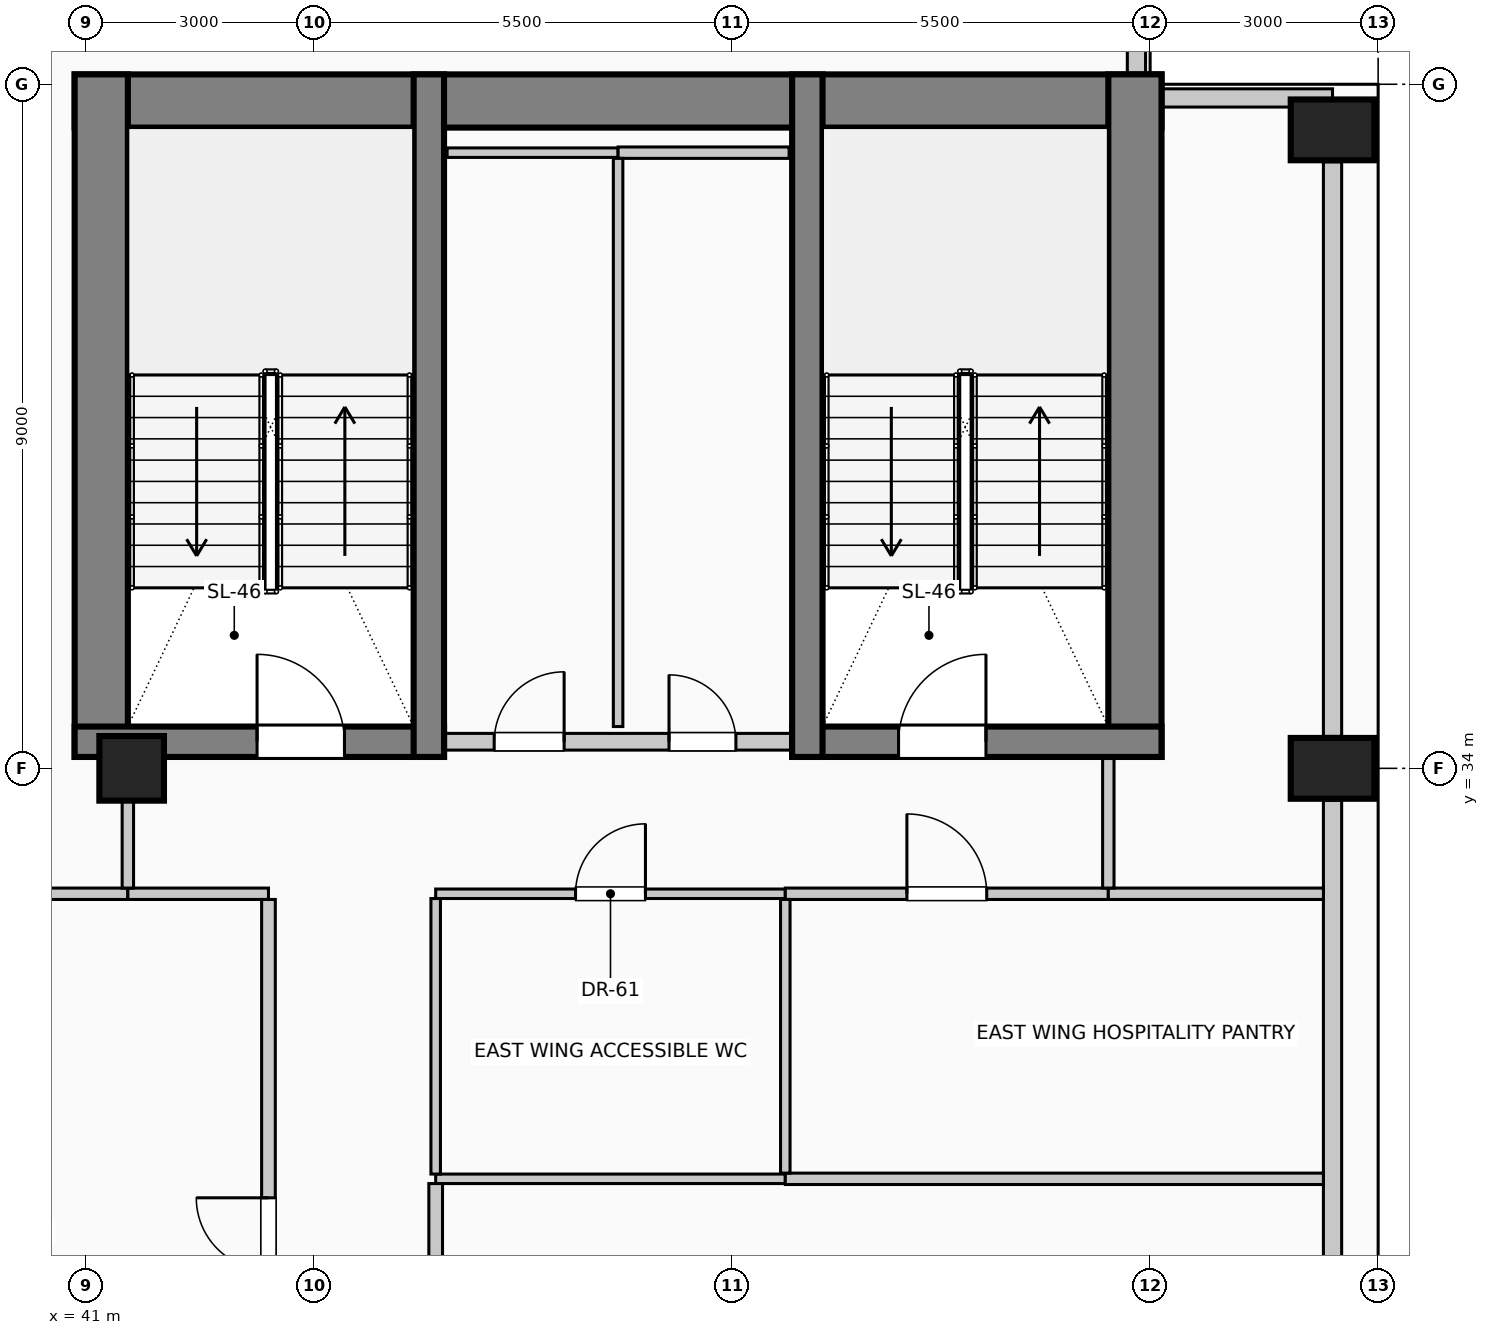
"""IFC4 building model, lengths in metres.
Left out: names, types, materials, properties, quantities, classifications, styles, units other than length and angle.
Written with IfcOpenShell. Run it as: python <this file> out.ifc"""

import sys

from ifc_helpers import new_model, si_unit, direction, frame, frame_2d, origin, origin_2d, place, context, subcontext, project, spatial, rectangle, circle, extrude, element, fill, save


model = new_model("IFC4")
c1 = context("Model", 3, precision=1e-05, world=origin(), true_north=direction((0.0, 1.0)))
c2 = subcontext(c1, "Body", "Model", "MODEL_VIEW")
j1 = project(units=[si_unit("LENGTHUNIT", "METRE"), si_unit("PLANEANGLEUNIT", "RADIAN")], contexts=[c1])
p1 = place(None, origin())
s1 = spatial("IfcSite", under=j1, at=p1, CompositionType="ELEMENT")
p2 = place(p1, origin())
s2 = spatial("IfcBuilding", under=s1, at=p2, CompositionType="ELEMENT")
p3 = place(p2, frame((0.0, 0.0, 194.6)))
s3 = spatial("IfcBuildingStorey", under=s2, at=p3, CompositionType="ELEMENT", Elevation=194.6)
p4 = place(p3, frame((40.85, 42.78, 0.0), z_axis=(0.0, 0.0, 1.0), x_axis=(1.0, 0.0, 0.0)))
e1 = element("IfcWall", 1, at=p4, inside=s3, PredefinedType="SHEAR", context=c2, shape_type="SweptSolid", body=[
    extrude(rectangle(XDim=14.3, YDim=0.7, at=frame_2d((7.15, 0.0))), origin(), (0.0, 0.0, 1.0), 4.0),
])
for number, where, z_axis, x_axis in (
    (2, (41.2, 34.15, 0.0), (0.0, 0.0, 1.0), (0.0, 1.0, 0.0)),
    (3, (54.8, 34.15, 0.0), (0.0, 0.0, 1.0), (0.0, 1.0, 0.0)),
):
    element("IfcWall", number, at=place(p3, frame(where, z_axis=z_axis, x_axis=x_axis)), inside=s3, PredefinedType="SHEAR", context=c2, shape_type="SweptSolid", body=[
        extrude(rectangle(XDim=8.98, YDim=0.7, at=frame_2d((4.49, 0.0))), origin(), (0.0, 0.0, 1.0), 4.0),
    ])
p5 = place(p3, frame((40.85, 34.35, 0.0), z_axis=(0.0, 0.0, 1.0), x_axis=(1.0, 0.0, 0.0)))
e4 = element("IfcWall", 4, at=p5, inside=s3, PredefinedType="SHEAR", context=c2, shape_type="SweptSolid", body=[
    extrude(rectangle(XDim=4.86, YDim=0.4, at=frame_2d((2.43, 0.0))), origin(), (0.0, 0.0, 1.0), 4.0),
])
p6 = place(p5, frame((2.4, 0.0, 0.0)))
e5 = element("IfcOpeningElement", 5, at=p6, cuts=e4, PredefinedType="OPENING", context=c2, shape_type="SweptSolid", body=[
    extrude(rectangle(XDim=1.15, YDim=2.2, at=frame_2d((0.575, 1.1))), frame((0.0, 0.21, 0.0), z_axis=(0.0, -1.0, 0.0), x_axis=(1.0, 0.0, 0.0)), (0.0, 0.0, 1.0), 0.42),
])
p7 = place(p3, frame((45.51, 34.15, 0.0), z_axis=(0.0, 0.0, 1.0), x_axis=(0.0, 1.0, 0.0)))
e6 = element("IfcWall", 6, at=p7, inside=s3, PredefinedType="SHEAR", context=c2, shape_type="SweptSolid", body=[
    extrude(rectangle(XDim=8.98, YDim=0.4, at=frame_2d((4.49, 0.0))), origin(), (0.0, 0.0, 1.0), 4.0),
])
p8 = place(p3, frame((50.29, 34.35, 0.0), z_axis=(0.0, 0.0, 1.0), x_axis=(1.0, 0.0, 0.0)))
e7 = element("IfcWall", 7, at=p8, inside=s3, PredefinedType="SHEAR", context=c2, shape_type="SweptSolid", body=[
    extrude(rectangle(XDim=4.86, YDim=0.4, at=frame_2d((2.43, 0.0))), origin(), (0.0, 0.0, 1.0), 4.0),
])
p9 = place(p8, frame((1.4, 0.0, 0.0)))
e8 = element("IfcOpeningElement", 8, at=p9, cuts=e7, PredefinedType="OPENING", context=c2, shape_type="SweptSolid", body=[
    extrude(rectangle(XDim=1.15, YDim=2.2, at=frame_2d((0.575, 1.1))), frame((0.0, 0.21, 0.0), z_axis=(0.0, -1.0, 0.0), x_axis=(1.0, 0.0, 0.0)), (0.0, 0.0, 1.0), 0.42),
])
p10 = place(p3, frame((50.49, 34.15, 0.0), z_axis=(0.0, 0.0, 1.0), x_axis=(0.0, 1.0, 0.0)))
e9 = element("IfcWall", 9, at=p10, inside=s3, PredefinedType="SHEAR", context=c2, shape_type="SweptSolid", body=[
    extrude(rectangle(XDim=8.98, YDim=0.4, at=frame_2d((4.49, 0.0))), origin(), (0.0, 0.0, 1.0), 4.0),
])
for number, where, z_axis, x_axis in (
    (10, (57.4, 34.0, 0.0), (0.0, 0.0, 1.0), (0.0, 1.0, 0.0)),
    (11, (57.4, 42.4, 0.0), (0.0, 0.0, 1.0), (0.0, 1.0, 0.0)),
):
    element("IfcColumn", number, at=place(p3, frame(where, z_axis=z_axis, x_axis=x_axis)), inside=s3, PredefinedType="COLUMN", context=c2, shape_type="SweptSolid", body=[
        extrude(rectangle(XDim=0.8, YDim=1.1, at=origin_2d()), origin(), (0.0, 0.0, 1.0), 4.0),
    ])
p11 = place(p3, frame((41.6, 34.0, 0.0), z_axis=(0.0, 0.0, 1.0), x_axis=(1.0, 0.0, 0.0)))
e12 = element("IfcColumn", 12, at=p11, inside=s3, PredefinedType="COLUMN", context=c2, shape_type="SweptSolid", body=[
    extrude(circle(Radius=0.425, at=origin_2d()), origin(), (0.0, 0.0, 1.0), 4.0),
])
p12 = place(p3, frame((57.4, 33.58, 0.0), z_axis=(0.0, 0.0, 1.0), x_axis=(0.0, -1.0, 0.0)))
e13 = element("IfcWall", 13, at=p12, inside=s3, PredefinedType="SOLIDWALL", context=c2, shape_type="SweptSolid", body=[
    extrude(rectangle(XDim=7.16, YDim=0.24, at=frame_2d((3.58, 0.0))), origin(), (0.0, 0.0, 1.0), 3.0),
])
p13 = place(p3, frame((57.4, 41.98, 0.0), z_axis=(0.0, 0.0, 1.0), x_axis=(0.0, -1.0, 0.0)))
e14 = element("IfcWall", 14, at=p13, inside=s3, PredefinedType="SOLIDWALL", context=c2, shape_type="SweptSolid", body=[
    extrude(rectangle(XDim=7.56, YDim=0.24, at=frame_2d((3.78, 0.0))), origin(), (0.0, 0.0, 1.0), 3.0),
])
p14 = place(p3, frame((54.82, 45.4, 0.0), z_axis=(0.0, 0.0, 1.0), x_axis=(0.0, -1.0, 0.0)))
e15 = element("IfcWall", 15, at=p14, inside=s3, PredefinedType="SOLIDWALL", context=c2, shape_type="SweptSolid", body=[
    extrude(rectangle(XDim=2.265, YDim=0.24, at=frame_2d((1.132, 0.0))), origin(), (0.0, 0.0, 1.0), 3.75),
])
p15 = place(p3, frame((55.155, 42.82, 0.0), z_axis=(0.0, 0.0, 1.0), x_axis=(1.0, 0.0, 0.0)))
e16 = element("IfcWall", 16, at=p15, inside=s3, PredefinedType="SOLIDWALL", context=c2, shape_type="SweptSolid", body=[
    extrude(rectangle(XDim=2.245, YDim=0.24, at=frame_2d((1.123, 0.0))), origin(), (0.0, 0.0, 1.0), 3.75),
])
p16 = place(p3, frame((45.72, 34.35, 0.0), z_axis=(0.0, 0.0, 1.0), x_axis=(1.0, 0.0, 0.0)))
e17 = element("IfcWall", 17, at=p16, inside=s3, PredefinedType="PARTITIONING", context=c2, shape_type="SweptSolid", body=[
    extrude(rectangle(XDim=4.56, YDim=0.22, at=frame_2d((2.28, 0.0))), origin(), (0.0, 0.0, 1.0), 3.75),
])
p17 = place(p16, frame((0.65, 0.0, 0.0)))
e18 = element("IfcOpeningElement", 18, at=p17, cuts=e17, PredefinedType="OPENING", context=c2, shape_type="SweptSolid", body=[
    extrude(rectangle(XDim=0.92, YDim=2.1, at=frame_2d((0.46, 1.05))), frame((0.0, 0.12, 0.0), z_axis=(0.0, -1.0, 0.0), x_axis=(1.0, 0.0, 0.0)), (0.0, 0.0, 1.0), 0.24),
])
p18 = place(p16, frame((2.95, 0.0, 0.0)))
e19 = element("IfcOpeningElement", 19, at=p18, cuts=e17, PredefinedType="OPENING", context=c2, shape_type="SweptSolid", body=[
    extrude(rectangle(XDim=0.88, YDim=2.1, at=frame_2d((0.44, 1.05))), frame((0.0, 0.12, 0.0), z_axis=(0.0, -1.0, 0.0), x_axis=(1.0, 0.0, 0.0)), (0.0, 0.0, 1.0), 0.24),
])
p19 = place(p3, frame((45.6, 28.6, 0.0), z_axis=(0.0, 0.0, 1.0), x_axis=(1.0, 0.0, 0.0)))
e20 = element("IfcWall", 20, at=p19, inside=s3, PredefinedType="PARTITIONING", context=c2, shape_type="SweptSolid", body=[
    extrude(rectangle(XDim=4.6, YDim=0.125, at=frame_2d((2.3, 0.0))), origin(), (0.0, 0.0, 1.0), 3.75),
])
p20 = place(p3, frame((50.2, 28.6, 0.0), z_axis=(0.0, 0.0, 1.0), x_axis=(1.0, 0.0, 0.0)))
e21 = element("IfcWall", 21, at=p20, inside=s3, PredefinedType="PARTITIONING", context=c2, shape_type="SweptSolid", body=[
    extrude(rectangle(XDim=7.08, YDim=0.15, at=frame_2d((3.54, 0.0))), origin(), (0.0, 0.0, 1.0), 3.75),
])
p21 = place(p3, frame((34.12, 32.35, 0.0), z_axis=(0.0, 0.0, 1.0), x_axis=(1.0, 0.0, 0.0)))
e22 = element("IfcWall", 22, at=p21, inside=s3, PredefinedType="PARTITIONING", context=c2, shape_type="SweptSolid", body=[
    extrude(rectangle(XDim=7.43, YDim=0.15, at=frame_2d((3.715, 0.0))), origin(), (0.0, 0.0, 1.0), 3.75),
])
p22 = place(p3, frame((41.55, 32.35, 0.0), z_axis=(0.0, 0.0, 1.0), x_axis=(1.0, 0.0, 0.0)))
e23 = element("IfcWall", 23, at=p22, inside=s3, PredefinedType="PARTITIONING", context=c2, shape_type="SweptSolid", body=[
    extrude(rectangle(XDim=1.85, YDim=0.15, at=frame_2d((0.925, 0.0))), origin(), (0.0, 0.0, 1.0), 3.75),
])
p23 = place(p3, frame((45.6, 32.35, 0.0), z_axis=(0.0, 0.0, 1.0), x_axis=(1.0, 0.0, 0.0)))
e24 = element("IfcWall", 24, at=p23, inside=s3, PredefinedType="PARTITIONING", context=c2, shape_type="SweptSolid", body=[
    extrude(rectangle(XDim=4.6, YDim=0.125, at=frame_2d((2.3, 0.0))), origin(), (0.0, 0.0, 1.0), 3.75),
])
p24 = place(p23, frame((1.84, 0.0, 0.0)))
e25 = element("IfcOpeningElement", 25, at=p24, cuts=e24, PredefinedType="OPENING", context=c2, shape_type="SweptSolid", body=[
    extrude(rectangle(XDim=0.92, YDim=2.1, at=frame_2d((0.46, 1.05))), frame((0.0, 0.073, 0.0), z_axis=(0.0, -1.0, 0.0), x_axis=(1.0, 0.0, 0.0)), (0.0, 0.0, 1.0), 0.145),
])
p25 = place(p3, frame((50.2, 32.35, 0.0), z_axis=(0.0, 0.0, 1.0), x_axis=(1.0, 0.0, 0.0)))
e26 = element("IfcWall", 26, at=p25, inside=s3, PredefinedType="PARTITIONING", context=c2, shape_type="SweptSolid", body=[
    extrude(rectangle(XDim=4.25, YDim=0.15, at=frame_2d((2.125, 0.0))), origin(), (0.0, 0.0, 1.0), 3.75),
])
p26 = place(p25, frame((1.6, 0.0, 0.0)))
e27 = element("IfcOpeningElement", 27, at=p26, cuts=e26, PredefinedType="OPENING", context=c2, shape_type="SweptSolid", body=[
    extrude(rectangle(XDim=1.05, YDim=2.15, at=frame_2d((0.525, 1.075))), frame((0.0, 0.085, 0.0), z_axis=(0.0, -1.0, 0.0), x_axis=(1.0, 0.0, 0.0)), (0.0, 0.0, 1.0), 0.17),
])
p27 = place(p3, frame((54.45, 32.35, 0.0), z_axis=(0.0, 0.0, 1.0), x_axis=(1.0, 0.0, 0.0)))
e28 = element("IfcWall", 28, at=p27, inside=s3, PredefinedType="PARTITIONING", context=c2, shape_type="SweptSolid", body=[
    extrude(rectangle(XDim=2.83, YDim=0.15, at=frame_2d((1.415, 0.0))), origin(), (0.0, 0.0, 1.0), 3.75),
])
p28 = place(p3, frame((45.75, 42.1, 0.0), z_axis=(0.0, 0.0, 1.0), x_axis=(1.0, 0.0, 0.0)))
e29 = element("IfcWall", 29, at=p28, inside=s3, PredefinedType="PARTITIONING", context=c2, shape_type="SweptSolid", body=[
    extrude(rectangle(XDim=2.25, YDim=0.125, at=frame_2d((1.125, 0.0))), origin(), (0.0, 0.0, 1.0), 3.75),
])
p29 = place(p3, frame((48.0, 42.1, 0.0), z_axis=(0.0, 0.0, 1.0), x_axis=(1.0, 0.0, 0.0)))
e30 = element("IfcWall", 30, at=p29, inside=s3, PredefinedType="PARTITIONING", context=c2, shape_type="SweptSolid", body=[
    extrude(rectangle(XDim=2.25, YDim=0.15, at=frame_2d((1.125, 0.0))), origin(), (0.0, 0.0, 1.0), 3.75),
])
p30 = place(p3, frame((41.55, 32.425, 0.0), z_axis=(0.0, 0.0, 1.0), x_axis=(0.0, 1.0, 0.0)))
e31 = element("IfcWall", 31, at=p30, inside=s3, PredefinedType="PARTITIONING", context=c2, shape_type="SweptSolid", body=[
    extrude(rectangle(XDim=1.15, YDim=0.15, at=frame_2d((0.575, 0.0))), origin(), (0.0, 0.0, 1.0), 3.145),
])
p31 = place(p3, frame((43.4, 23.475, 0.0), z_axis=(0.0, 0.0, 1.0), x_axis=(0.0, 1.0, 0.0)))
e32 = element("IfcWall", 32, at=p31, inside=s3, PredefinedType="PARTITIONING", context=c2, shape_type="SweptSolid", body=[
    extrude(rectangle(XDim=8.8, YDim=0.18, at=frame_2d((4.4, 0.0))), origin(), (0.0, 0.0, 1.0), 3.75),
])
p32 = place(p31, frame((3.925, 0.0, 0.0)))
e33 = element("IfcOpeningElement", 33, at=p32, cuts=e32, PredefinedType="OPENING", context=c2, shape_type="SweptSolid", body=[
    extrude(rectangle(XDim=0.95, YDim=2.15, at=frame_2d((0.475, 1.075))), frame((0.0, 0.1, 0.0), z_axis=(0.0, -1.0, 0.0), x_axis=(1.0, 0.0, 0.0)), (0.0, 0.0, 1.0), 0.2),
])
p33 = place(p3, frame((45.6, 14.39, 0.0), z_axis=(0.0, 0.0, 1.0), x_axis=(0.0, 1.0, 0.0)))
e34 = element("IfcWall", 34, at=p33, inside=s3, PredefinedType="PARTITIONING", context=c2, shape_type="SweptSolid", body=[
    extrude(rectangle(XDim=14.148, YDim=0.18, at=frame_2d((7.074, 0.0))), origin(), (0.0, 0.0, 1.0), 3.75),
])
p34 = place(p3, frame((45.6, 28.663, 0.0), z_axis=(0.0, 0.0, 1.0), x_axis=(0.0, 1.0, 0.0)))
e35 = element("IfcWall", 35, at=p34, inside=s3, PredefinedType="PARTITIONING", context=c2, shape_type="SweptSolid", body=[
    extrude(rectangle(XDim=3.625, YDim=0.125, at=frame_2d((1.812, 0.0))), origin(), (0.0, 0.0, 1.0), 3.75),
])
p35 = place(p3, frame((48.0, 34.55, 0.0), z_axis=(0.0, 0.0, 1.0), x_axis=(0.0, 1.0, 0.0)))
e36 = element("IfcWall", 36, at=p35, inside=s3, PredefinedType="PARTITIONING", context=c2, shape_type="SweptSolid", body=[
    extrude(rectangle(XDim=7.475, YDim=0.125, at=frame_2d((3.737, 0.0))), origin(), (0.0, 0.0, 1.0), 3.75),
])
p36 = place(p3, frame((50.2, 28.675, 0.0), z_axis=(0.0, 0.0, 1.0), x_axis=(0.0, 1.0, 0.0)))
e37 = element("IfcWall", 37, at=p36, inside=s3, PredefinedType="PARTITIONING", context=c2, shape_type="SweptSolid", body=[
    extrude(rectangle(XDim=3.6, YDim=0.125, at=frame_2d((1.8, 0.0))), origin(), (0.0, 0.0, 1.0), 3.75),
])
p37 = place(p3, frame((54.45, 32.425, 0.0), z_axis=(0.0, 0.0, 1.0), x_axis=(0.0, 1.0, 0.0)))
e38 = element("IfcWall", 38, at=p37, inside=s3, PredefinedType="PARTITIONING", context=c2, shape_type="SweptSolid", body=[
    extrude(rectangle(XDim=1.725, YDim=0.15, at=frame_2d((0.862, 0.0))), origin(), (0.0, 0.0, 1.0), 3.75),
])
p38 = place(p6, origin())
e39 = element("IfcDoor", 39, at=p38, inside=s3, OperationType="SINGLE_SWING_LEFT", PredefinedType="DOOR", context=c2, shape_type="SweptSolid", body=[
    extrude(rectangle(XDim=1.15, YDim=2.2, at=frame_2d((0.575, 1.1))), frame((0.0, 0.025, 0.0), z_axis=(0.0, -1.0, 0.0), x_axis=(1.0, 0.0, 0.0)), (0.0, 0.0, 1.0), 0.05),
])
fill(e5, e39)
p39 = place(p17, origin())
e40 = element("IfcDoor", 40, at=p39, inside=s3, OperationType="SINGLE_SWING_RIGHT", PredefinedType="DOOR", context=c2, shape_type="SweptSolid", body=[
    extrude(rectangle(XDim=0.92, YDim=2.1, at=frame_2d((0.46, 1.05))), frame((0.0, 0.025, 0.0), z_axis=(0.0, -1.0, 0.0), x_axis=(1.0, 0.0, 0.0)), (0.0, 0.0, 1.0), 0.05),
])
fill(e18, e40)
p40 = place(p18, origin())
e41 = element("IfcDoor", 41, at=p40, inside=s3, OperationType="SINGLE_SWING_LEFT", PredefinedType="DOOR", context=c2, shape_type="SweptSolid", body=[
    extrude(rectangle(XDim=0.88, YDim=2.1, at=frame_2d((0.44, 1.05))), frame((0.0, 0.025, 0.0), z_axis=(0.0, -1.0, 0.0), x_axis=(1.0, 0.0, 0.0)), (0.0, 0.0, 1.0), 0.05),
])
fill(e19, e41)
p41 = place(p9, origin())
e42 = element("IfcDoor", 42, at=p41, inside=s3, OperationType="SINGLE_SWING_RIGHT", PredefinedType="DOOR", context=c2, shape_type="SweptSolid", body=[
    extrude(rectangle(XDim=1.15, YDim=2.2, at=frame_2d((0.575, 1.1))), frame((0.0, 0.025, 0.0), z_axis=(0.0, -1.0, 0.0), x_axis=(1.0, 0.0, 0.0)), (0.0, 0.0, 1.0), 0.05),
])
fill(e8, e42)
p42 = place(p24, origin())
e43 = element("IfcDoor", 43, at=p42, inside=s3, OperationType="SINGLE_SWING_RIGHT", PredefinedType="DOOR", context=c2, shape_type="SweptSolid", body=[
    extrude(rectangle(XDim=0.92, YDim=2.1, at=frame_2d((0.46, 1.05))), frame((0.0, 0.025, 0.0), z_axis=(0.0, -1.0, 0.0), x_axis=(1.0, 0.0, 0.0)), (0.0, 0.0, 1.0), 0.05),
])
fill(e25, e43)
p43 = place(p26, origin())
e44 = element("IfcDoor", 44, at=p43, inside=s3, OperationType="SINGLE_SWING_LEFT", PredefinedType="DOOR", context=c2, shape_type="SweptSolid", body=[
    extrude(rectangle(XDim=1.05, YDim=2.15, at=frame_2d((0.525, 1.075))), frame((0.0, 0.025, 0.0), z_axis=(0.0, -1.0, 0.0), x_axis=(1.0, 0.0, 0.0)), (0.0, 0.0, 1.0), 0.05),
])
fill(e27, e44)
p44 = place(p32, origin())
e45 = element("IfcDoor", 45, at=p44, inside=s3, OperationType="SINGLE_SWING_RIGHT", PredefinedType="DOOR", context=c2, shape_type="SweptSolid", body=[
    extrude(rectangle(XDim=0.95, YDim=2.15, at=frame_2d((0.475, 1.075))), frame((0.0, 0.025, 0.0), z_axis=(0.0, -1.0, 0.0), x_axis=(1.0, 0.0, 0.0)), (0.0, 0.0, 1.0), 0.05),
])
fill(e33, e45)
save(model, sys.argv[1])
